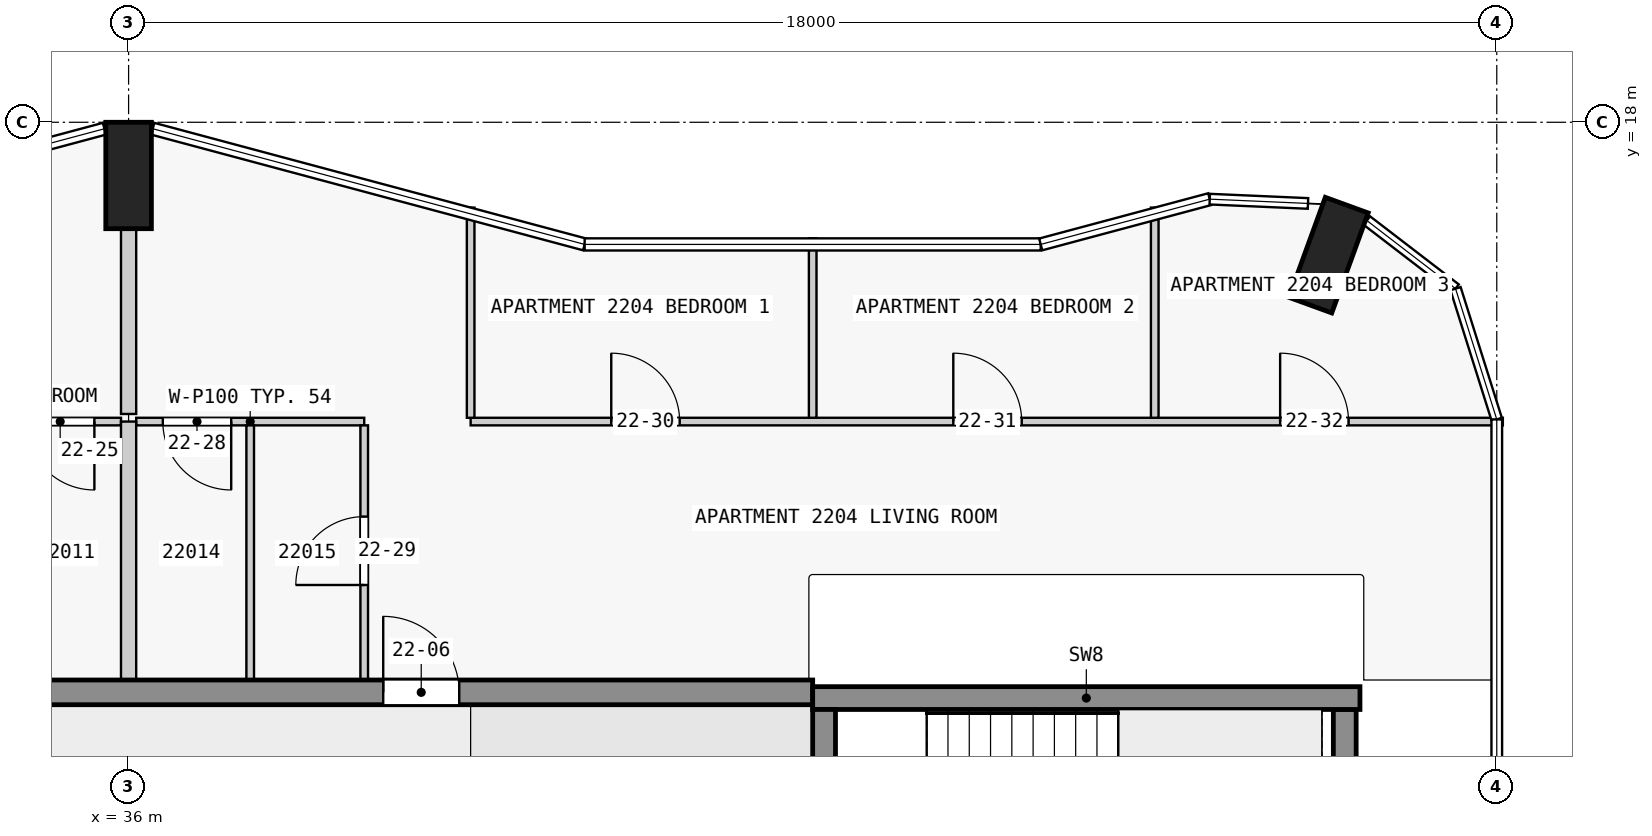
"""IFC4 building model, lengths in metres.
Left out: names, types, materials, properties, quantities, classifications, styles, units other than length and angle.
Written with IfcOpenShell. Run it as: python <this file> out.ifc"""

import sys

from ifc_helpers import new_model, si_unit, direction, frame, frame_2d, origin, origin_2d, place, context, subcontext, project, spatial, rectangle, extrude, element, fill, save


model = new_model("IFC4")
c1 = context("Model", 3, precision=1e-05, world=origin(), true_north=direction((0.0, 1.0)))
c2 = subcontext(c1, "Body", "Model", "MODEL_VIEW")
j1 = project(units=[si_unit("LENGTHUNIT", "METRE"), si_unit("PLANEANGLEUNIT", "RADIAN")], contexts=[c1])
p1 = place(None, origin())
s1 = spatial("IfcSite", under=j1, at=p1, CompositionType="ELEMENT")
p2 = place(p1, origin())
s2 = spatial("IfcBuilding", under=s1, at=p2, CompositionType="ELEMENT")
p3 = place(p2, frame((0.0, 0.0, 88.8)))
s3 = spatial("IfcBuildingStorey", under=s2, at=p3, CompositionType="ELEMENT", Elevation=88.8)
for number, where, z_axis, x_axis in (
    (1, (51.787, 16.252, 0.0), (0.0, 0.0, 1.0), (-0.94, 0.342, 0.0)),
    (2, (36.0, 17.3, 0.0), (0.0, 0.0, 1.0), (1.0, 0.0, 0.0)),
):
    element("IfcColumn", number, at=place(p3, frame(where, z_axis=z_axis, x_axis=x_axis)), inside=s3, PredefinedType="COLUMN", context=c2, shape_type="SweptSolid", body=[
        extrude(rectangle(XDim=0.6, YDim=1.4, at=origin_2d()), origin(), (0.0, 0.0, 1.0), 3.5),
    ])
p4 = place(p3, frame((45.15, 7.725, 0.0), z_axis=(0.0, 0.0, 1.0), x_axis=(0.0, 1.0, 0.0)))
e3 = element("IfcWall", 3, at=p4, inside=s3, PredefinedType="SHEAR", context=c2, shape_type="SweptSolid", body=[
    extrude(rectangle(XDim=2.55, YDim=0.3, at=frame_2d((1.275, 0.0))), origin(), (0.0, 0.0, 1.0), 3.5),
])
p5 = place(p4, frame((0.725, 0.0, 0.0)))
e4 = element("IfcOpeningElement", 4, at=p5, cuts=e3, PredefinedType="OPENING", context=c2, shape_type="SweptSolid", body=[
    extrude(rectangle(XDim=1.1, YDim=2.1, at=frame_2d((0.55, 1.05))), frame((0.0, 0.16, 0.0), z_axis=(0.0, -1.0, 0.0), x_axis=(1.0, 0.0, 0.0)), (0.0, 0.0, 1.0), 0.32),
])
p6 = place(p3, frame((52.0, 7.725, 0.0), z_axis=(0.0, 0.0, 1.0), x_axis=(0.0, 1.0, 0.0)))
e5 = element("IfcWall", 5, at=p6, inside=s3, PredefinedType="SHEAR", context=c2, shape_type="SweptSolid", body=[
    extrude(rectangle(XDim=2.55, YDim=0.3, at=frame_2d((1.275, 0.0))), origin(), (0.0, 0.0, 1.0), 3.5),
])
p7 = place(p3, frame((45.0, 10.425, 0.0), z_axis=(0.0, 0.0, 1.0), x_axis=(1.0, 0.0, 0.0)))
e6 = element("IfcWall", 6, at=p7, inside=s3, PredefinedType="SHEAR", context=c2, shape_type="SweptSolid", body=[
    extrude(rectangle(XDim=7.2, YDim=0.3, at=frame_2d((3.6, 0.0))), origin(), (0.0, 0.0, 1.0), 3.5),
])
p8 = place(p3, frame((22.5, 10.5, 0.0), z_axis=(0.0, 0.0, 1.0), x_axis=(1.0, 0.0, 0.0)))
e7 = element("IfcWall", 7, at=p8, inside=s3, PredefinedType="SHEAR", context=c2, shape_type="SweptSolid", body=[
    extrude(rectangle(XDim=22.5, YDim=0.325, at=frame_2d((11.25, 0.0))), origin(), (0.0, 0.0, 1.0), 3.25),
])
p9 = place(p8, frame((4.75, 0.0, 0.0)))
e8 = element("IfcOpeningElement", 8, at=p9, cuts=e7, PredefinedType="OPENING", context=c2, shape_type="SweptSolid", body=[
    extrude(rectangle(XDim=1.0, YDim=2.1, at=frame_2d((0.5, 1.05))), frame((0.0, 0.172, 0.0), z_axis=(0.0, -1.0, 0.0), x_axis=(1.0, 0.0, 0.0)), (0.0, 0.0, 1.0), 0.345),
])
p10 = place(p8, frame((16.85, 0.0, 0.0)))
e9 = element("IfcOpeningElement", 9, at=p10, cuts=e7, PredefinedType="OPENING", context=c2, shape_type="SweptSolid", body=[
    extrude(rectangle(XDim=1.0, YDim=2.1, at=frame_2d((0.5, 1.05))), frame((0.0, 0.172, 0.0), z_axis=(0.0, -1.0, 0.0), x_axis=(1.0, 0.0, 0.0)), (0.0, 0.0, 1.0), 0.345),
])
p11 = place(p3, frame((35.9, 14.062, 0.0), z_axis=(0.0, 0.0, 1.0), x_axis=(-1.0, 0.0, 0.0)))
e10 = element("IfcWall", 10, at=p11, inside=s3, PredefinedType="PARTITIONING", context=c2, shape_type="SweptSolid", body=[
    extrude(rectangle(XDim=3.0, YDim=0.1, at=frame_2d((1.5, 0.0))), origin(), (0.0, 0.0, 1.0), 3.25),
])
p12 = place(p11, frame((0.35, 0.0, 0.0)))
e11 = element("IfcOpeningElement", 11, at=p12, cuts=e10, PredefinedType="OPENING", context=c2, shape_type="SweptSolid", body=[
    extrude(rectangle(XDim=0.9, YDim=2.1, at=frame_2d((0.45, 1.05))), frame((0.0, 0.06, 0.0), z_axis=(0.0, -1.0, 0.0), x_axis=(1.0, 0.0, 0.0)), (0.0, 0.0, 1.0), 0.12),
])
p13 = place(p3, frame((39.1, 14.062, 0.0), z_axis=(0.0, 0.0, 1.0), x_axis=(-1.0, 0.0, 0.0)))
e12 = element("IfcWall", 12, at=p13, inside=s3, PredefinedType="PARTITIONING", context=c2, shape_type="SweptSolid", body=[
    extrude(rectangle(XDim=3.0, YDim=0.1, at=frame_2d((1.5, 0.0))), origin(), (0.0, 0.0, 1.0), 3.25),
])
p14 = place(p13, frame((1.75, 0.0, 0.0)))
e13 = element("IfcOpeningElement", 13, at=p14, cuts=e12, PredefinedType="OPENING", context=c2, shape_type="SweptSolid", body=[
    extrude(rectangle(XDim=0.9, YDim=2.1, at=frame_2d((0.45, 1.05))), frame((0.0, 0.06, 0.0), z_axis=(0.0, -1.0, 0.0), x_axis=(1.0, 0.0, 0.0)), (0.0, 0.0, 1.0), 0.12),
])
p15 = place(p3, frame((40.5, 14.062, 0.0), z_axis=(0.0, 0.0, 1.0), x_axis=(1.0, 0.0, 0.0)))
e14 = element("IfcWall", 14, at=p15, inside=s3, PredefinedType="PARTITIONING", context=c2, shape_type="SweptSolid", body=[
    extrude(rectangle(XDim=13.58, YDim=0.1, at=frame_2d((6.79, 0.0))), origin(), (0.0, 0.0, 1.0), 3.25),
])
p16 = place(p15, frame((1.85, 0.0, 0.0)))
e15 = element("IfcOpeningElement", 15, at=p16, cuts=e14, PredefinedType="OPENING", context=c2, shape_type="SweptSolid", body=[
    extrude(rectangle(XDim=0.9, YDim=2.1, at=frame_2d((0.45, 1.05))), frame((0.0, 0.06, 0.0), z_axis=(0.0, -1.0, 0.0), x_axis=(1.0, 0.0, 0.0)), (0.0, 0.0, 1.0), 0.12),
])
p17 = place(p15, frame((6.35, 0.0, 0.0)))
e16 = element("IfcOpeningElement", 16, at=p17, cuts=e14, PredefinedType="OPENING", context=c2, shape_type="SweptSolid", body=[
    extrude(rectangle(XDim=0.9, YDim=2.1, at=frame_2d((0.45, 1.05))), frame((0.0, 0.06, 0.0), z_axis=(0.0, -1.0, 0.0), x_axis=(1.0, 0.0, 0.0)), (0.0, 0.0, 1.0), 0.12),
])
p18 = place(p15, frame((10.65, 0.0, 0.0)))
e17 = element("IfcOpeningElement", 17, at=p18, cuts=e14, PredefinedType="OPENING", context=c2, shape_type="SweptSolid", body=[
    extrude(rectangle(XDim=0.9, YDim=2.1, at=frame_2d((0.45, 1.05))), frame((0.0, 0.06, 0.0), z_axis=(0.0, -1.0, 0.0), x_axis=(1.0, 0.0, 0.0)), (0.0, 0.0, 1.0), 0.12),
])
p19 = place(p3, frame((36.0, 16.6, 0.0), z_axis=(0.0, 0.0, 1.0), x_axis=(0.0, -1.0, 0.0)))
e18 = element("IfcWall", 18, at=p19, inside=s3, PredefinedType="PARTITIONING", context=c2, shape_type="SweptSolid", body=[
    extrude(rectangle(XDim=2.438, YDim=0.2, at=frame_2d((1.219, 0.0))), origin(), (0.0, 0.0, 1.0), 3.25),
])
p20 = place(p3, frame((36.0, 10.663, 0.0), z_axis=(0.0, 0.0, 1.0), x_axis=(0.0, 1.0, 0.0)))
e19 = element("IfcWall", 19, at=p20, inside=s3, PredefinedType="PARTITIONING", context=c2, shape_type="SweptSolid", body=[
    extrude(rectangle(XDim=3.4, YDim=0.2, at=frame_2d((1.7, 0.0))), origin(), (0.0, 0.0, 1.0), 3.25),
])
p21 = place(p3, frame((37.6, 10.663, 0.0), z_axis=(0.0, 0.0, 1.0), x_axis=(0.0, 1.0, 0.0)))
e20 = element("IfcWall", 20, at=p21, inside=s3, PredefinedType="PARTITIONING", context=c2, shape_type="SweptSolid", body=[
    extrude(rectangle(XDim=3.35, YDim=0.1, at=frame_2d((1.675, 0.0))), origin(), (0.0, 0.0, 1.0), 3.25),
])
p22 = place(p3, frame((39.1, 10.663, 0.0), z_axis=(0.0, 0.0, 1.0), x_axis=(0.0, 1.0, 0.0)))
e21 = element("IfcWall", 21, at=p22, inside=s3, PredefinedType="PARTITIONING", context=c2, shape_type="SweptSolid", body=[
    extrude(rectangle(XDim=3.35, YDim=0.1, at=frame_2d((1.675, 0.0))), origin(), (0.0, 0.0, 1.0), 3.25),
])
p23 = place(p22, frame((1.25, 0.0, 0.0)))
e22 = element("IfcOpeningElement", 22, at=p23, cuts=e21, PredefinedType="OPENING", context=c2, shape_type="SweptSolid", body=[
    extrude(rectangle(XDim=0.9, YDim=2.1, at=frame_2d((0.45, 1.05))), frame((0.0, 0.06, 0.0), z_axis=(0.0, -1.0, 0.0), x_axis=(1.0, 0.0, 0.0)), (0.0, 0.0, 1.0), 0.12),
])
p24 = place(p3, frame((40.5, 16.878, 0.0), z_axis=(0.0, 0.0, 1.0), x_axis=(0.0, -1.0, 0.0)))
e23 = element("IfcWall", 23, at=p24, inside=s3, PredefinedType="PARTITIONING", context=c2, shape_type="SweptSolid", body=[
    extrude(rectangle(XDim=2.765, YDim=0.1, at=frame_2d((1.383, 0.0))), origin(), (0.0, 0.0, 1.0), 3.25),
])
p25 = place(p3, frame((45.0, 14.113, 0.0), z_axis=(0.0, 0.0, 1.0), x_axis=(0.0, 1.0, 0.0)))
e24 = element("IfcWall", 24, at=p25, inside=s3, PredefinedType="PARTITIONING", context=c2, shape_type="SweptSolid", body=[
    extrude(rectangle(XDim=2.361, YDim=0.1, at=frame_2d((1.18, 0.0))), origin(), (0.0, 0.0, 1.0), 3.25),
])
p26 = place(p3, frame((49.5, 14.113, 0.0), z_axis=(0.0, 0.0, 1.0), x_axis=(0.0, 1.0, 0.0)))
e25 = element("IfcWall", 25, at=p26, inside=s3, PredefinedType="PARTITIONING", context=c2, shape_type="SweptSolid", body=[
    extrude(rectangle(XDim=2.765, YDim=0.1, at=frame_2d((1.383, 0.0))), origin(), (0.0, 0.0, 1.0), 3.25),
])
p27 = place(p10, origin())
e26 = element("IfcDoor", 26, at=p27, inside=s3, OperationType="SINGLE_SWING_RIGHT", PredefinedType="DOOR", context=c2, shape_type="SweptSolid", body=[
    extrude(rectangle(XDim=1.0, YDim=2.1, at=frame_2d((0.5, 1.05))), frame((0.0, 0.025, 0.0), z_axis=(0.0, -1.0, 0.0), x_axis=(1.0, 0.0, 0.0)), (0.0, 0.0, 1.0), 0.05),
])
fill(e9, e26)
p28 = place(p12, origin())
e27 = element("IfcDoor", 27, at=p28, inside=s3, OperationType="SINGLE_SWING_LEFT", PredefinedType="DOOR", context=c2, shape_type="SweptSolid", body=[
    extrude(rectangle(XDim=0.9, YDim=2.1, at=frame_2d((0.45, 1.05))), frame((0.0, 0.025, 0.0), z_axis=(0.0, -1.0, 0.0), x_axis=(1.0, 0.0, 0.0)), (0.0, 0.0, 1.0), 0.05),
])
fill(e11, e27)
p29 = place(p14, origin())
e28 = element("IfcDoor", 28, at=p29, inside=s3, OperationType="SINGLE_SWING_RIGHT", PredefinedType="DOOR", context=c2, shape_type="SweptSolid", body=[
    extrude(rectangle(XDim=0.9, YDim=2.1, at=frame_2d((0.45, 1.05))), frame((0.0, 0.025, 0.0), z_axis=(0.0, -1.0, 0.0), x_axis=(1.0, 0.0, 0.0)), (0.0, 0.0, 1.0), 0.05),
])
fill(e13, e28)
p30 = place(p23, origin())
e29 = element("IfcDoor", 29, at=p30, inside=s3, OperationType="SINGLE_SWING_RIGHT", PredefinedType="DOOR", context=c2, shape_type="SweptSolid", body=[
    extrude(rectangle(XDim=0.9, YDim=2.1, at=frame_2d((0.45, 1.05))), frame((0.0, 0.025, 0.0), z_axis=(0.0, -1.0, 0.0), x_axis=(1.0, 0.0, 0.0)), (0.0, 0.0, 1.0), 0.05),
])
fill(e22, e29)
p31 = place(p16, origin())
e30 = element("IfcDoor", 30, at=p31, inside=s3, OperationType="SINGLE_SWING_LEFT", PredefinedType="DOOR", context=c2, shape_type="SweptSolid", body=[
    extrude(rectangle(XDim=0.9, YDim=2.1, at=frame_2d((0.45, 1.05))), frame((0.0, 0.025, 0.0), z_axis=(0.0, -1.0, 0.0), x_axis=(1.0, 0.0, 0.0)), (0.0, 0.0, 1.0), 0.05),
])
fill(e15, e30)
p32 = place(p17, origin())
e31 = element("IfcDoor", 31, at=p32, inside=s3, OperationType="SINGLE_SWING_RIGHT", PredefinedType="DOOR", context=c2, shape_type="SweptSolid", body=[
    extrude(rectangle(XDim=0.9, YDim=2.1, at=frame_2d((0.45, 1.05))), frame((0.0, 0.025, 0.0), z_axis=(0.0, -1.0, 0.0), x_axis=(1.0, 0.0, 0.0)), (0.0, 0.0, 1.0), 0.05),
])
fill(e16, e31)
p33 = place(p18, origin())
e32 = element("IfcDoor", 32, at=p33, inside=s3, OperationType="SINGLE_SWING_RIGHT", PredefinedType="DOOR", context=c2, shape_type="SweptSolid", body=[
    extrude(rectangle(XDim=0.9, YDim=2.1, at=frame_2d((0.45, 1.05))), frame((0.0, 0.025, 0.0), z_axis=(0.0, -1.0, 0.0), x_axis=(1.0, 0.0, 0.0)), (0.0, 0.0, 1.0), 0.05),
])
fill(e17, e32)
save(model, sys.argv[1])
